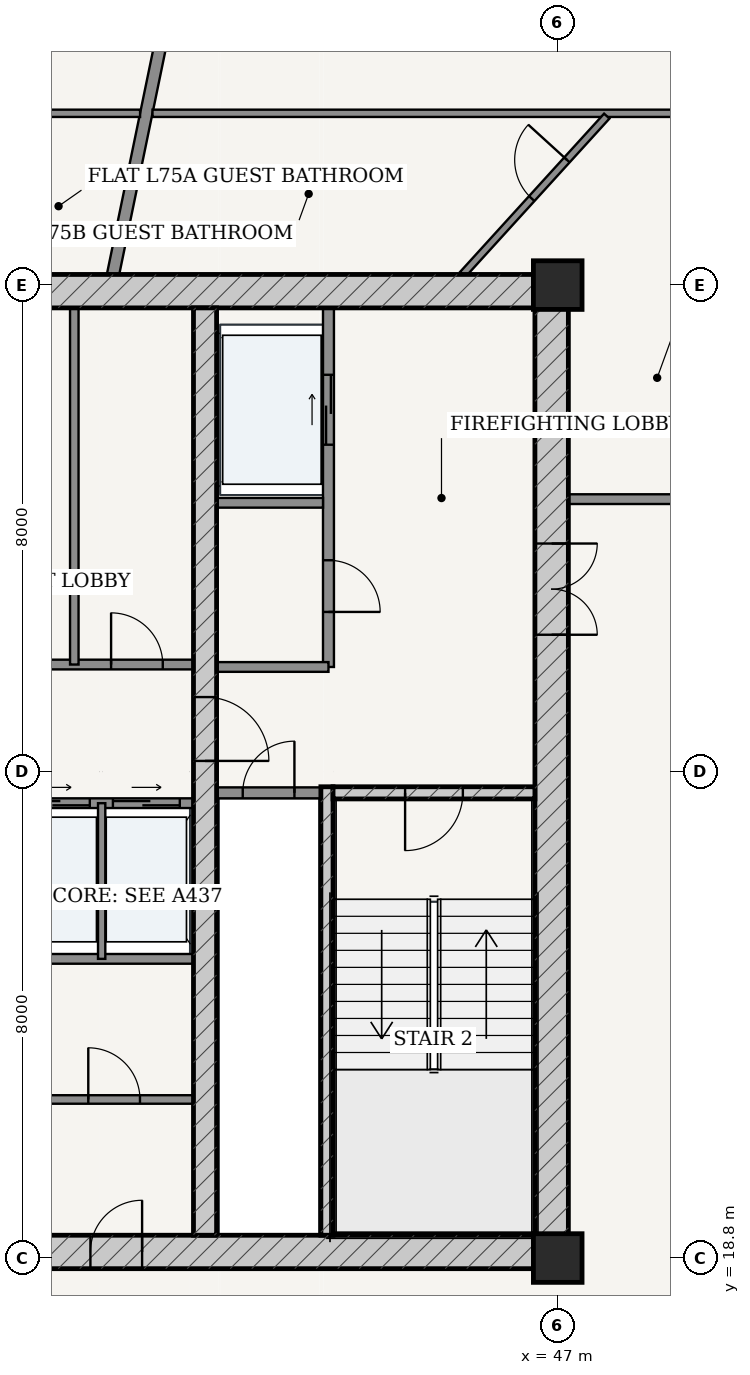
"""IFC4 building model, lengths in metres.
Left out: names, types, materials, properties, quantities, classifications, styles, units other than length and angle.
Written with IfcOpenShell. Run it as: python <this file> out.ifc"""

import sys

from ifc_helpers import new_model, si_unit, direction, frame, frame_2d, origin, origin_2d, place, context, subcontext, project, spatial, rectangle, extrude, source, transform, mapped, element, fill, save


model = new_model("IFC4")
c1 = context("Model", 3, precision=1e-05, world=origin(), true_north=direction((-0.2419218956, 0.970295726276)))
c2 = subcontext(c1, "Body", "Model", "MODEL_VIEW")
j1 = project(units=[si_unit("LENGTHUNIT", "METRE"), si_unit("PLANEANGLEUNIT", "RADIAN")], contexts=[c1])
p1 = place(None, origin())
s1 = spatial("IfcSite", under=j1, at=p1, CompositionType="ELEMENT")
p2 = place(p1, origin())
s2 = spatial("IfcBuilding", under=s1, at=p2, CompositionType="ELEMENT")
p3 = place(p2, frame((0.0, 0.0, 285.7)))
s3 = spatial("IfcBuildingStorey", under=s2, at=p3, CompositionType="ELEMENT", Elevation=285.7)
for number, where, z_axis, x_axis in (
    (1, (47.0, 18.8, 0.0), (0.0, 0.0, 1.0), (1.0, 0.0, 0.0)),
    (2, (47.0, 34.8, 0.0), (0.0, 0.0, 1.0), (1.0, 0.0, 0.0)),
):
    element("IfcColumn", number, at=place(p3, frame(where, z_axis=z_axis, x_axis=x_axis)), inside=s3, PredefinedType="COLUMN", context=c2, shape_type="SweptSolid", body=[
        extrude(rectangle(XDim=0.8, YDim=0.8, at=origin_2d()), origin(), (0.0, 0.0, 1.0), 3.75),
    ])
p4 = place(p3, frame((28.825, 18.9, 0.0), z_axis=(0.0, 0.0, 1.0), x_axis=(1.0, 0.0, 0.0)))
e3 = element("IfcWall", 3, at=p4, inside=s3, PredefinedType="SHEAR", context=c2, shape_type="SweptSolid", body=[
    extrude(rectangle(XDim=18.35, YDim=0.55, at=frame_2d((9.175, 0.0))), origin(), (0.0, 0.0, 1.0), 3.49),
])
p5 = place(p4, frame((7.41, 0.0, 0.0)))
e4 = element("IfcOpeningElement", 4, at=p5, cuts=e3, PredefinedType="OPENING", context=c2, shape_type="SweptSolid", body=[
    extrude(rectangle(XDim=0.85, YDim=2.1, at=frame_2d((0.425, 1.05))), frame((0.0, 0.285, 0.0), z_axis=(0.0, -1.0, 0.0), x_axis=(1.0, 0.0, 0.0)), (0.0, 0.0, 1.0), 0.57),
])
p6 = place(p4, frame((10.49, 0.0, 0.0)))
e5 = element("IfcOpeningElement", 5, at=p6, cuts=e3, PredefinedType="OPENING", context=c2, shape_type="SweptSolid", body=[
    extrude(rectangle(XDim=0.85, YDim=2.1, at=frame_2d((0.425, 1.05))), frame((0.0, 0.285, 0.0), z_axis=(0.0, -1.0, 0.0), x_axis=(1.0, 0.0, 0.0)), (0.0, 0.0, 1.0), 0.57),
])
p7 = place(p3, frame((28.825, 34.7, 0.0), z_axis=(0.0, 0.0, 1.0), x_axis=(1.0, 0.0, 0.0)))
e6 = element("IfcWall", 6, at=p7, inside=s3, PredefinedType="SHEAR", context=c2, shape_type="SweptSolid", body=[
    extrude(rectangle(XDim=18.35, YDim=0.55, at=frame_2d((9.175, 0.0))), origin(), (0.0, 0.0, 1.0), 3.49),
])
p8 = place(p3, frame((46.9, 19.175, 0.0), z_axis=(0.0, 0.0, 1.0), x_axis=(0.0, 1.0, 0.0)))
e7 = element("IfcWall", 7, at=p8, inside=s3, PredefinedType="SHEAR", context=c2, shape_type="SweptSolid", body=[
    extrude(rectangle(XDim=15.25, YDim=0.55, at=frame_2d((7.625, 0.0))), origin(), (0.0, 0.0, 1.0), 3.49),
])
p9 = place(p8, frame((9.875, 0.0, 0.0)))
e8 = element("IfcOpeningElement", 8, at=p9, cuts=e7, PredefinedType="OPENING", context=c2, shape_type="SweptSolid", body=[
    extrude(rectangle(XDim=1.5, YDim=2.2, at=frame_2d((0.75, 1.1))), frame((0.0, 0.285, 0.0), z_axis=(0.0, -1.0, 0.0), x_axis=(1.0, 0.0, 0.0)), (0.0, 0.0, 1.0), 0.57),
])
p10 = place(p3, frame((43.205, 19.175, 0.0), z_axis=(0.0, 0.0, 1.0), x_axis=(0.0, 1.0, 0.0)))
e9 = element("IfcWall", 9, at=p10, inside=s3, PredefinedType="SOLIDWALL", context=c2, shape_type="SweptSolid", body=[
    extrude(rectangle(XDim=7.375, YDim=0.2, at=frame_2d((3.688, 0.0))), origin(), (0.0, 0.0, 1.0), 3.49),
])
p11 = place(p3, frame((43.305, 26.45, 0.0), z_axis=(0.0, 0.0, 1.0), x_axis=(1.0, 0.0, 0.0)))
e10 = element("IfcWall", 10, at=p11, inside=s3, PredefinedType="SOLIDWALL", context=c2, shape_type="SweptSolid", body=[
    extrude(rectangle(XDim=3.32, YDim=0.2, at=frame_2d((1.66, 0.0))), origin(), (0.0, 0.0, 1.0), 3.49),
])
p12 = place(p11, frame((1.185, 0.0, 0.0)))
e11 = element("IfcOpeningElement", 11, at=p12, cuts=e10, PredefinedType="OPENING", context=c2, shape_type="SweptSolid", body=[
    extrude(rectangle(XDim=0.95, YDim=2.15, at=frame_2d((0.475, 1.075))), frame((0.0, 0.11, 0.0), z_axis=(0.0, -1.0, 0.0), x_axis=(1.0, 0.0, 0.0)), (0.0, 0.0, 1.0), 0.22),
])
p13 = place(p3, frame((41.2, 19.175, 0.0), z_axis=(0.0, 0.0, 1.0), x_axis=(0.0, 1.0, 0.0)))
e12 = element("IfcWall", 12, at=p13, inside=s3, PredefinedType="SHEAR", context=c2, shape_type="SweptSolid", body=[
    extrude(rectangle(XDim=15.25, YDim=0.38, at=frame_2d((7.625, 0.0))), origin(), (0.0, 0.0, 1.0), 3.49),
])
p14 = place(p13, frame((7.8, 0.0, 0.0)))
e13 = element("IfcOpeningElement", 13, at=p14, cuts=e12, PredefinedType="OPENING", context=c2, shape_type="SweptSolid", body=[
    extrude(rectangle(XDim=1.05, YDim=2.15, at=frame_2d((0.525, 1.075))), frame((0.0, 0.2, 0.0), z_axis=(0.0, -1.0, 0.0), x_axis=(1.0, 0.0, 0.0)), (0.0, 0.0, 1.0), 0.4),
])
p15 = place(p3, frame((54.163, 37.117, 0.0), z_axis=(0.0, 0.0, 1.0), x_axis=(-0.719979309073, 0.693995529169, 0.0)))
e14 = element("IfcWall", 14, at=p15, inside=s3, PredefinedType="SOLIDWALL", context=c2, shape_type="SweptSolid", body=[
    extrude(rectangle(XDim=7.583, YDim=0.28, at=frame_2d((3.791, 0.0))), origin(), (0.0, 0.0, 1.0), 3.49),
])
p16 = place(p15, frame((1.272, 0.0, 0.85)))
e15 = element("IfcOpeningElement", 15, at=p16, cuts=e14, PredefinedType="OPENING", context=c2, shape_type="SweptSolid", body=[
    extrude(rectangle(XDim=1.55, YDim=1.95, at=frame_2d((0.775, 0.975))), frame((0.0, 0.15, 0.0), z_axis=(0.0, -1.0, 0.0), x_axis=(1.0, 0.0, 0.0)), (0.0, 0.0, 1.0), 0.3),
])
p17 = place(p15, frame((4.76, 0.0, 0.85)))
e16 = element("IfcOpeningElement", 16, at=p17, cuts=e14, PredefinedType="OPENING", context=c2, shape_type="SweptSolid", body=[
    extrude(rectangle(XDim=1.55, YDim=1.95, at=frame_2d((0.775, 0.975))), frame((0.0, 0.15, 0.0), z_axis=(0.0, -1.0, 0.0), x_axis=(1.0, 0.0, 0.0)), (0.0, 0.0, 1.0), 0.3),
])
p18 = place(p3, frame((41.39, 26.45, 0.0), z_axis=(0.0, 0.0, 1.0), x_axis=(1.0, 0.0, 0.0)))
e17 = element("IfcWall", 17, at=p18, inside=s3, PredefinedType="PARTITIONING", context=c2, shape_type="SweptSolid", body=[
    extrude(rectangle(XDim=1.71, YDim=0.18, at=frame_2d((0.855, 0.0))), origin(), (0.0, 0.0, 1.0), 3.49),
])
p19 = place(p18, frame((0.43, 0.0, 0.0)))
e18 = element("IfcOpeningElement", 18, at=p19, cuts=e17, PredefinedType="OPENING", context=c2, shape_type="SweptSolid", body=[
    extrude(rectangle(XDim=0.85, YDim=2.1, at=frame_2d((0.425, 1.05))), frame((0.0, 0.1, 0.0), z_axis=(0.0, -1.0, 0.0), x_axis=(1.0, 0.0, 0.0)), (0.0, 0.0, 1.0), 0.2),
])
p20 = place(p3, frame((43.23, 28.52, 0.0), z_axis=(0.0, 0.0, 1.0), x_axis=(0.0, 1.0, 0.0)))
e19 = element("IfcWall", 19, at=p20, inside=s3, PredefinedType="PARTITIONING", context=c2, shape_type="SweptSolid", body=[
    extrude(rectangle(XDim=5.905, YDim=0.18, at=frame_2d((2.953, 0.0))), origin(), (0.0, 0.0, 1.0), 3.49),
])
p21 = place(p20, frame((0.905, 0.0, 0.0)))
e20 = element("IfcOpeningElement", 20, at=p21, cuts=e19, PredefinedType="OPENING", context=c2, shape_type="SweptSolid", body=[
    extrude(rectangle(XDim=0.85, YDim=2.1, at=frame_2d((0.425, 1.05))), frame((0.0, 0.1, 0.0), z_axis=(0.0, -1.0, 0.0), x_axis=(1.0, 0.0, 0.0)), (0.0, 0.0, 1.0), 0.2),
])
p22 = place(p20, frame((3.655, 0.0, 0.0)))
e21 = element("IfcOpeningElement", 21, at=p22, cuts=e19, PredefinedType="OPENING", context=c2, shape_type="SweptSolid", body=[
    extrude(rectangle(XDim=1.15, YDim=2.2, at=frame_2d((0.575, 1.1))), frame((0.0, 0.1, 0.0), z_axis=(0.0, -1.0, 0.0), x_axis=(1.0, 0.0, 0.0)), (0.0, 0.0, 1.0), 0.2),
])
p23 = place(p3, frame((41.39, 31.22, 0.0), z_axis=(0.0, 0.0, 1.0), x_axis=(1.0, 0.0, 0.0)))
e22 = element("IfcWall", 22, at=p23, inside=s3, PredefinedType="PARTITIONING", context=c2, shape_type="SweptSolid", body=[
    extrude(rectangle(XDim=1.75, YDim=0.16, at=frame_2d((0.875, 0.0))), origin(), (0.0, 0.0, 1.0), 3.49),
])
p24 = place(p3, frame((41.39, 28.52, 0.0), z_axis=(0.0, 0.0, 1.0), x_axis=(1.0, 0.0, 0.0)))
e23 = element("IfcWall", 23, at=p24, inside=s3, PredefinedType="PARTITIONING", context=c2, shape_type="SweptSolid", body=[
    extrude(rectangle(XDim=1.84, YDim=0.16, at=frame_2d((0.92, 0.0))), origin(), (0.0, 0.0, 1.0), 3.49),
])
p25 = place(p3, frame((34.99, 28.56, 0.0), z_axis=(0.0, 0.0, 1.0), x_axis=(1.0, 0.0, 0.0)))
e24 = element("IfcWall", 24, at=p25, inside=s3, PredefinedType="PARTITIONING", context=c2, shape_type="SweptSolid", body=[
    extrude(rectangle(XDim=6.02, YDim=0.16, at=frame_2d((3.01, 0.0))), origin(), (0.0, 0.0, 1.0), 3.49),
])
p26 = place(p25, frame((0.505, 0.0, 0.0)))
e25 = element("IfcOpeningElement", 25, at=p26, cuts=e24, PredefinedType="OPENING", context=c2, shape_type="SweptSolid", body=[
    extrude(rectangle(XDim=0.85, YDim=2.1, at=frame_2d((0.425, 1.05))), frame((0.0, 0.09, 0.0), z_axis=(0.0, -1.0, 0.0), x_axis=(1.0, 0.0, 0.0)), (0.0, 0.0, 1.0), 0.18),
])
p27 = place(p25, frame((2.58, 0.0, 0.0)))
e26 = element("IfcOpeningElement", 26, at=p27, cuts=e24, PredefinedType="OPENING", context=c2, shape_type="SweptSolid", body=[
    extrude(rectangle(XDim=0.86, YDim=2.1, at=frame_2d((0.43, 1.05))), frame((0.0, 0.09, 0.0), z_axis=(0.0, -1.0, 0.0), x_axis=(1.0, 0.0, 0.0)), (0.0, 0.0, 1.0), 0.18),
])
p28 = place(p25, frame((4.665, 0.0, 0.0)))
e27 = element("IfcOpeningElement", 27, at=p28, cuts=e24, PredefinedType="OPENING", context=c2, shape_type="SweptSolid", body=[
    extrude(rectangle(XDim=0.85, YDim=2.1, at=frame_2d((0.425, 1.05))), frame((0.0, 0.09, 0.0), z_axis=(0.0, -1.0, 0.0), x_axis=(1.0, 0.0, 0.0)), (0.0, 0.0, 1.0), 0.18),
])
p29 = place(p3, frame((39.05, 28.56, 0.0), z_axis=(0.0, 0.0, 1.0), x_axis=(0.0, 1.0, 0.0)))
e28 = element("IfcWall", 28, at=p29, inside=s3, PredefinedType="PARTITIONING", context=c2, shape_type="SweptSolid", body=[
    extrude(rectangle(XDim=5.865, YDim=0.14, at=frame_2d((2.933, 0.0))), origin(), (0.0, 0.0, 1.0), 3.49),
])
p30 = place(p3, frame((34.99, 26.28, 0.0), z_axis=(0.0, 0.0, 1.0), x_axis=(1.0, 0.0, 0.0)))
e29 = element("IfcWall", 29, at=p30, inside=s3, PredefinedType="PARTITIONING", context=c2, shape_type="SweptSolid", body=[
    extrude(rectangle(XDim=6.02, YDim=0.16, at=frame_2d((3.01, 0.0))), origin(), (0.0, 0.0, 1.0), 3.49),
])
p31 = place(p30, frame((1.045, 0.0, 0.0)))
e30 = element("IfcOpeningElement", 30, at=p31, cuts=e29, PredefinedType="OPENING", context=c2, shape_type="SweptSolid", body=[
    extrude(rectangle(XDim=0.85, YDim=2.1, at=frame_2d((0.425, 1.05))), frame((0.0, 0.09, 0.0), z_axis=(0.0, -1.0, 0.0), x_axis=(1.0, 0.0, 0.0)), (0.0, 0.0, 1.0), 0.18),
])
p32 = place(p30, frame((3.215, 0.0, 0.0)))
e31 = element("IfcOpeningElement", 31, at=p32, cuts=e29, PredefinedType="OPENING", context=c2, shape_type="SweptSolid", body=[
    extrude(rectangle(XDim=1.1, YDim=2.2, at=frame_2d((0.55, 1.1))), frame((0.0, 0.09, 0.0), z_axis=(0.0, -1.0, 0.0), x_axis=(1.0, 0.0, 0.0)), (0.0, 0.0, 1.0), 0.18),
])
p33 = place(p30, frame((4.695, 0.0, 0.0)))
e32 = element("IfcOpeningElement", 32, at=p33, cuts=e29, PredefinedType="OPENING", context=c2, shape_type="SweptSolid", body=[
    extrude(rectangle(XDim=1.1, YDim=2.2, at=frame_2d((0.55, 1.1))), frame((0.0, 0.09, 0.0), z_axis=(0.0, -1.0, 0.0), x_axis=(1.0, 0.0, 0.0)), (0.0, 0.0, 1.0), 0.18),
])
p34 = place(p3, frame((34.99, 23.72, 0.0), z_axis=(0.0, 0.0, 1.0), x_axis=(1.0, 0.0, 0.0)))
e33 = element("IfcWall", 33, at=p34, inside=s3, PredefinedType="PARTITIONING", context=c2, shape_type="SweptSolid", body=[
    extrude(rectangle(XDim=6.02, YDim=0.16, at=frame_2d((3.01, 0.0))), origin(), (0.0, 0.0, 1.0), 3.49),
])
p35 = place(p3, frame((39.5, 23.72, 0.0), z_axis=(0.0, 0.0, 1.0), x_axis=(0.0, 1.0, 0.0)))
e34 = element("IfcWall", 34, at=p35, inside=s3, PredefinedType="PARTITIONING", context=c2, shape_type="SweptSolid", body=[
    extrude(rectangle(XDim=2.56, YDim=0.12, at=frame_2d((1.28, 0.0))), origin(), (0.0, 0.0, 1.0), 3.49),
])
p36 = place(p3, frame((38.4, 21.407, 0.0), z_axis=(0.0, 0.0, 1.0), x_axis=(1.0, 0.0, 0.0)))
e35 = element("IfcWall", 35, at=p36, inside=s3, PredefinedType="PARTITIONING", context=c2, shape_type="SweptSolid", body=[
    extrude(rectangle(XDim=2.61, YDim=0.14, at=frame_2d((1.305, 0.0))), origin(), (0.0, 0.0, 1.0), 3.49),
])
p37 = place(p36, frame((0.88, 0.0, 0.0)))
e36 = element("IfcOpeningElement", 36, at=p37, cuts=e35, PredefinedType="OPENING", context=c2, shape_type="SweptSolid", body=[
    extrude(rectangle(XDim=0.85, YDim=2.1, at=frame_2d((0.425, 1.05))), frame((0.0, 0.08, 0.0), z_axis=(0.0, -1.0, 0.0), x_axis=(1.0, 0.0, 0.0)), (0.0, 0.0, 1.0), 0.16),
])
p38 = place(p3, frame((47.175, 31.28, 0.0), z_axis=(0.0, 0.0, 1.0), x_axis=(1.0, 0.0, 0.0)))
e37 = element("IfcWall", 37, at=p38, inside=s3, PredefinedType="PARTITIONING", context=c2, shape_type="SweptSolid", body=[
    extrude(rectangle(XDim=1.93, YDim=0.16, at=frame_2d((0.965, 0.0))), origin(), (0.0, 0.0, 1.0), 3.49),
])
p39 = place(p3, frame((39.688, 34.977, 0.0), z_axis=(0.0, 0.0, 1.0), x_axis=(0.202091890364, 0.979366564596, 0.0)))
e38 = element("IfcWall", 38, at=p39, inside=s3, PredefinedType="PARTITIONING", context=c2, shape_type="SweptSolid", body=[
    extrude(rectangle(XDim=10.278, YDim=0.2, at=frame_2d((5.139, 0.0))), origin(), (0.0, 0.0, 1.0), 2.575),
])
p40 = place(p3, frame((26.175, 37.625, 0.0), z_axis=(0.0, 0.0, 1.0), x_axis=(1.0, 0.0, 0.0)))
e39 = element("IfcWall", 39, at=p40, inside=s3, PredefinedType="PARTITIONING", context=c2, shape_type="SweptSolid", body=[
    extrude(rectangle(XDim=13.957, YDim=0.12, at=frame_2d((6.979, 0.0))), origin(), (0.0, 0.0, 1.0), 3.015),
])
p41 = place(p40, frame((10.852, 0.0, 0.0)))
e40 = element("IfcOpeningElement", 40, at=p41, cuts=e39, PredefinedType="OPENING", context=c2, shape_type="SweptSolid", body=[
    extrude(rectangle(XDim=0.86, YDim=2.15, at=frame_2d((0.43, 1.075))), frame((0.0, 0.07, 0.0), z_axis=(0.0, -1.0, 0.0), x_axis=(1.0, 0.0, 0.0)), (0.0, 0.0, 1.0), 0.14),
])
p42 = place(p40, frame((4.183, 0.0, 0.0)))
e41 = element("IfcOpeningElement", 41, at=p42, cuts=e39, PredefinedType="OPENING", context=c2, shape_type="SweptSolid", body=[
    extrude(rectangle(XDim=0.9, YDim=2.15, at=frame_2d((0.45, 1.075))), frame((0.0, 0.07, 0.0), z_axis=(0.0, -1.0, 0.0), x_axis=(1.0, 0.0, 0.0)), (0.0, 0.0, 1.0), 0.14),
])
p43 = place(p3, frame((40.336, 37.625, 0.0), z_axis=(0.0, 0.0, 1.0), x_axis=(1.0, 0.0, 0.0)))
e42 = element("IfcWall", 42, at=p43, inside=s3, PredefinedType="PARTITIONING", context=c2, shape_type="SweptSolid", body=[
    extrude(rectangle(XDim=9.489, YDim=0.12, at=frame_2d((4.745, 0.0))), origin(), (0.0, 0.0, 1.0), 3.015),
])
p44 = place(p3, frame((45.439, 34.977, 0.0), z_axis=(0.0, 0.0, 1.0), x_axis=(0.672980108938, 0.739660579573, 0.0)))
e43 = element("IfcWall", 43, at=p44, inside=s3, PredefinedType="PARTITIONING", context=c2, shape_type="SweptSolid", body=[
    extrude(rectangle(XDim=3.519, YDim=0.12, at=frame_2d((1.759, 0.0))), origin(), (0.0, 0.0, 1.0), 3.015),
])
p45 = place(p44, frame((1.685, 0.0, 0.0)))
e44 = element("IfcOpeningElement", 44, at=p45, cuts=e43, PredefinedType="OPENING", context=c2, shape_type="SweptSolid", body=[
    extrude(rectangle(XDim=0.86, YDim=2.15, at=frame_2d((0.43, 1.075))), frame((0.0, 0.07, 0.0), z_axis=(0.0, -1.0, 0.0), x_axis=(1.0, 0.0, 0.0)), (0.0, 0.0, 1.0), 0.14),
])
m1 = source(origin(), c2, "Body", "SweptSolid", [
    extrude(rectangle(XDim=1.5, YDim=2.2, at=frame_2d((0.75, 1.1))), frame((0.0, 0.025, 0.0), z_axis=(0.0, -1.0, 0.0), x_axis=(1.0, 0.0, 0.0)), (0.0, 0.0, 1.0), 0.05),
])
p46 = place(p9, frame((1.5, 0.0, 0.0), z_axis=(0.0, 0.0, 1.0), x_axis=(-1.0, 0.0, 0.0)))
e45 = element("IfcDoor", 45, at=p46, inside=s3, OperationType="DOUBLE_DOOR_SINGLE_SWING", PredefinedType="DOOR", context=c2, shape_type="MappedRepresentation", body=[
    mapped(m1, transform((0.0, 0.0, 0.0), scale=1.0)),
])
fill(e8, e45)
m2 = source(origin(), c2, "Body", "SweptSolid", [
    extrude(rectangle(XDim=1.05, YDim=2.15, at=frame_2d((0.525, 1.075))), frame((0.0, 0.025, 0.0), z_axis=(0.0, -1.0, 0.0), x_axis=(1.0, 0.0, 0.0)), (0.0, 0.0, 1.0), 0.05),
])
p47 = place(p14, frame((1.05, 0.0, 0.0), z_axis=(0.0, 0.0, 1.0), x_axis=(-1.0, 0.0, 0.0)))
e46 = element("IfcDoor", 46, at=p47, inside=s3, OperationType="SINGLE_SWING_RIGHT", PredefinedType="DOOR", context=c2, shape_type="MappedRepresentation", body=[
    mapped(m2, transform((0.0, 0.0, 0.0), scale=1.0)),
])
fill(e13, e46)
m3 = source(origin(), c2, "Body", "SweptSolid", [
    extrude(rectangle(XDim=0.95, YDim=2.15, at=frame_2d((0.475, 1.075))), frame((0.0, 0.025, 0.0), z_axis=(0.0, -1.0, 0.0), x_axis=(1.0, 0.0, 0.0)), (0.0, 0.0, 1.0), 0.05),
])
p48 = place(p12, frame((0.95, 0.0, 0.0), z_axis=(0.0, 0.0, 1.0), x_axis=(-1.0, 0.0, 0.0)))
e47 = element("IfcDoor", 47, at=p48, inside=s3, OperationType="SINGLE_SWING_RIGHT", PredefinedType="DOOR", context=c2, shape_type="MappedRepresentation", body=[
    mapped(m3, transform((0.0, 0.0, 0.0), scale=1.0)),
])
fill(e11, e47)
m4 = source(origin(), c2, "Body", "SweptSolid", [
    extrude(rectangle(XDim=0.85, YDim=2.1, at=frame_2d((0.425, 1.05))), frame((0.0, 0.025, 0.0), z_axis=(0.0, -1.0, 0.0), x_axis=(1.0, 0.0, 0.0)), (0.0, 0.0, 1.0), 0.05),
])
p49 = place(p19, origin())
e48 = element("IfcDoor", 48, at=p49, inside=s3, OperationType="SINGLE_SWING_RIGHT", PredefinedType="DOOR", context=c2, shape_type="MappedRepresentation", body=[
    mapped(m4, transform((0.0, 0.0, 0.0), scale=1.0)),
])
fill(e18, e48)
p50 = place(p21, frame((0.85, 0.0, 0.0), z_axis=(0.0, 0.0, 1.0), x_axis=(-1.0, 0.0, 0.0)))
e49 = element("IfcDoor", 49, at=p50, inside=s3, OperationType="SINGLE_SWING_RIGHT", PredefinedType="DOOR", context=c2, shape_type="MappedRepresentation", body=[
    mapped(m4, transform((0.0, 0.0, 0.0), scale=1.0)),
])
fill(e20, e49)
p51 = place(p28, origin())
e50 = element("IfcDoor", 50, at=p51, inside=s3, OperationType="SINGLE_SWING_LEFT", PredefinedType="DOOR", context=c2, shape_type="MappedRepresentation", body=[
    mapped(m4, transform((0.0, 0.0, 0.0), scale=1.0)),
])
fill(e27, e50)
p52 = place(p6, origin())
e51 = element("IfcDoor", 51, at=p52, inside=s3, OperationType="SINGLE_SWING_RIGHT", PredefinedType="DOOR", context=c2, shape_type="MappedRepresentation", body=[
    mapped(m4, transform((0.0, 0.0, 0.0), scale=1.0)),
])
fill(e5, e51)
p53 = place(p37, origin())
e52 = element("IfcDoor", 52, at=p53, inside=s3, OperationType="SINGLE_SWING_LEFT", PredefinedType="DOOR", context=c2, shape_type="MappedRepresentation", body=[
    mapped(m4, transform((0.0, 0.0, 0.0), scale=1.0)),
])
fill(e36, e52)
m5 = source(origin(), c2, "Body", "SweptSolid", [
    extrude(rectangle(XDim=1.15, YDim=2.2, at=frame_2d((0.575, 1.1))), frame((0.0, 0.025, 0.0), z_axis=(0.0, -1.0, 0.0), x_axis=(1.0, 0.0, 0.0)), (0.0, 0.0, 1.0), 0.05),
])
p54 = place(p22, origin())
e53 = element("IfcDoor", 53, at=p54, inside=s3, OperationType="DOUBLE_DOOR_SLIDING", PredefinedType="DOOR", context=c2, shape_type="MappedRepresentation", body=[
    mapped(m5, transform((0.0, 0.0, 0.0), scale=1.0)),
])
fill(e21, e53)
m6 = source(origin(), c2, "Body", "SweptSolid", [
    extrude(rectangle(XDim=1.1, YDim=2.2, at=frame_2d((0.55, 1.1))), frame((0.0, 0.025, 0.0), z_axis=(0.0, -1.0, 0.0), x_axis=(1.0, 0.0, 0.0)), (0.0, 0.0, 1.0), 0.05),
])
p55 = place(p32, origin())
e54 = element("IfcDoor", 54, at=p55, inside=s3, OperationType="DOUBLE_DOOR_SLIDING", PredefinedType="DOOR", context=c2, shape_type="MappedRepresentation", body=[
    mapped(m6, transform((0.0, 0.0, 0.0), scale=1.0)),
])
fill(e31, e54)
p56 = place(p33, origin())
e55 = element("IfcDoor", 55, at=p56, inside=s3, OperationType="DOUBLE_DOOR_SLIDING", PredefinedType="DOOR", context=c2, shape_type="MappedRepresentation", body=[
    mapped(m6, transform((0.0, 0.0, 0.0), scale=1.0)),
])
fill(e32, e55)
m7 = source(origin(), c2, "Body", "SweptSolid", [
    extrude(rectangle(XDim=0.86, YDim=2.15, at=frame_2d((0.43, 1.075))), frame((0.0, 0.025, 0.0), z_axis=(0.0, -1.0, 0.0), x_axis=(1.0, 0.0, 0.0)), (0.0, 0.0, 1.0), 0.05),
])
p57 = place(p45, origin())
e56 = element("IfcDoor", 56, at=p57, inside=s3, OperationType="SINGLE_SWING_RIGHT", PredefinedType="DOOR", context=c2, shape_type="MappedRepresentation", body=[
    mapped(m7, transform((0.0, 0.0, 0.0), scale=1.0)),
])
fill(e44, e56)
save(model, sys.argv[1])
